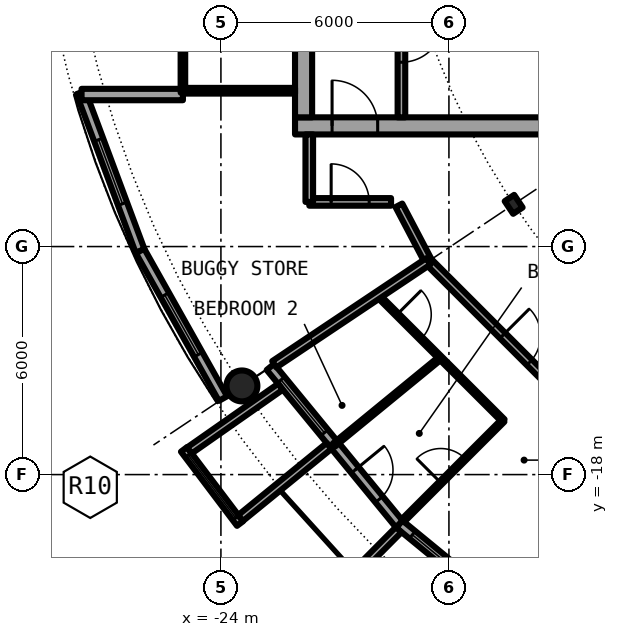
"""IFC4 building model, lengths in metres.
Left out: names, types, materials, properties, quantities, classifications, styles, units other than length and angle.
Written with IfcOpenShell. Run it as: python <this file> out.ifc"""

import sys

from ifc_helpers import new_model, si_unit, direction, frame, frame_2d, origin, origin_2d, place, context, subcontext, project, spatial, rectangle, circle, hollow_circle, i_section, extrude, element, fill, save


model = new_model("IFC4")
c1 = context("Model", 3, precision=1e-05, world=origin(), true_north=direction((0.0, 1.0)))
c2 = subcontext(c1, "Body", "Model", "MODEL_VIEW")
j1 = project(units=[si_unit("LENGTHUNIT", "METRE"), si_unit("PLANEANGLEUNIT", "RADIAN")], contexts=[c1])
p1 = place(None, origin())
s1 = spatial("IfcSite", under=j1, at=p1, CompositionType="ELEMENT")
p2 = place(p1, origin())
s2 = spatial("IfcBuilding", under=s1, at=p2, CompositionType="ELEMENT")
p3 = place(p2, frame((0.0, 0.0, 199.35)))
s3 = spatial("IfcBuildingStorey", under=s2, at=p3, CompositionType="ELEMENT", Elevation=199.35)
p4 = place(p3, frame((-23.448, -15.667, 0.0), z_axis=(0.0, 0.0, 1.0), x_axis=(1.0, 0.0, 0.0)))
e1 = element("IfcColumn", 1, at=p4, inside=s3, PredefinedType="COLUMN", context=c2, shape_type="SweptSolid", body=[
    extrude(hollow_circle(Radius=0.406, WallThickness=0.03, at=origin_2d()), origin(), (0.0, 0.0, 1.0), 3.05),
])
p5 = place(p3, frame((-16.297, -10.889, 0.0), z_axis=(0.0, 0.0, 1.0), x_axis=(-0.831469612303, -0.55557023302, 0.0)))
e2 = element("IfcColumn", 2, at=p5, inside=s3, PredefinedType="COLUMN", context=c2, shape_type="SweptSolid", body=[
    extrude(i_section(OverallWidth=0.3, OverallDepth=0.4, WebThickness=0.013, FlangeThickness=0.024, FilletRadius=0.027, at=origin_2d()), origin(), (0.0, 0.0, 1.0), 3.05),
])
p6 = place(p3, frame((-22.699, -15.167, 0.0), z_axis=(0.0, 0.0, 1.0), x_axis=(0.634382322723, -0.773019449054, 0.0)))
e3 = element("IfcWall", 3, at=p6, inside=s3, PredefinedType="SOLIDWALL", context=c2, shape_type="SweptSolid", body=[
    extrude(rectangle(XDim=5.352, YDim=0.25, at=frame_2d((2.676, 0.0))), origin(), (0.0, 0.0, 1.0), 2.7),
])
p7 = place(p6, frame((0.441, 0.0, 0.3)))
e4 = element("IfcOpeningElement", 4, at=p7, cuts=e3, PredefinedType="OPENING", context=c2, shape_type="SweptSolid", body=[
    extrude(rectangle(XDim=1.8, YDim=2.1, at=frame_2d((0.9, 1.05))), frame((0.0, 0.135, 0.0), z_axis=(0.0, -1.0, 0.0), x_axis=(1.0, 0.0, 0.0)), (0.0, 0.0, 1.0), 0.27),
])
p8 = place(p6, frame((3.51, 0.0, 0.0)))
e5 = element("IfcOpeningElement", 5, at=p8, cuts=e3, PredefinedType="OPENING", context=c2, shape_type="SweptSolid", body=[
    extrude(rectangle(XDim=1.0, YDim=2.2, at=frame_2d((0.5, 1.1))), frame((0.0, 0.135, 0.0), z_axis=(0.0, -1.0, 0.0), x_axis=(1.0, 0.0, 0.0)), (0.0, 0.0, 1.0), 0.27),
])
p9 = place(p3, frame((-24.972, -17.337, -0.03), z_axis=(0.0, 0.0, 1.0), x_axis=(0.602806268067, -0.797887588059, 0.0)))
e6 = element("IfcWall", 6, at=p9, inside=s3, PredefinedType="SOLIDWALL", context=c2, shape_type="SweptSolid", body=[
    extrude(rectangle(XDim=2.447, YDim=0.2, at=frame_2d((1.223, 0.0))), origin(), (0.0, 0.0, 1.0), 2.73),
])
p10 = place(p9, frame((0.183, 0.0, 0.33)))
e7 = element("IfcOpeningElement", 7, at=p10, cuts=e6, PredefinedType="OPENING", context=c2, shape_type="SweptSolid", body=[
    extrude(circle(Radius=1.04, at=frame_2d((1.04, 1.04))), frame((0.0, 0.11, 0.0), z_axis=(0.0, -1.0, 0.0), x_axis=(1.0, 0.0, 0.0)), (0.0, 0.0, 1.0), 0.22),
])
p11 = place(p3, frame((-22.433, -15.688, -0.03), z_axis=(0.0, 0.0, 1.0), x_axis=(-0.819373043115, -0.573260687834, 0.0)))
e8 = element("IfcWall", 8, at=p11, inside=s3, PredefinedType="SOLIDWALL", context=c2, shape_type="SweptSolid", body=[
    extrude(rectangle(XDim=2.925, YDim=0.2, at=frame_2d((1.463, 0.0))), origin(), (0.0, 0.0, 1.0), 2.73),
])
p12 = place(p3, frame((-21.155, -17.246, -0.03), z_axis=(0.0, 0.0, 1.0), x_axis=(-0.775179004516, -0.631741648902, 0.0)))
e9 = element("IfcWall", 9, at=p12, inside=s3, PredefinedType="SOLIDWALL", context=c2, shape_type="SweptSolid", body=[
    extrude(rectangle(XDim=3.006, YDim=0.2, at=frame_2d((1.503, 0.0))), origin(), (0.0, 0.0, 1.0), 2.73),
])
p13 = place(p3, frame((-19.304, -19.304, 0.0), z_axis=(0.0, 0.0, 1.0), x_axis=(0.773019449054, -0.634382322723, 0.0)))
e10 = element("IfcWall", 10, at=p13, inside=s3, PredefinedType="SOLIDWALL", context=c2, shape_type="SweptSolid", body=[
    extrude(rectangle(XDim=5.352, YDim=0.25, at=frame_2d((2.676, 0.0))), origin(), (0.0, 0.0, 1.0), 2.7),
])
p14 = place(p13, frame((0.441, 0.0, 0.3)))
e11 = element("IfcOpeningElement", 11, at=p14, cuts=e10, PredefinedType="OPENING", context=c2, shape_type="SweptSolid", body=[
    extrude(rectangle(XDim=1.8, YDim=2.1, at=frame_2d((0.9, 1.05))), frame((0.0, 0.135, 0.0), z_axis=(0.0, -1.0, 0.0), x_axis=(1.0, 0.0, 0.0)), (0.0, 0.0, 1.0), 0.27),
])
p15 = place(p13, frame((3.51, 0.0, 0.0)))
e12 = element("IfcOpeningElement", 12, at=p15, cuts=e10, PredefinedType="OPENING", context=c2, shape_type="SweptSolid", body=[
    extrude(rectangle(XDim=1.0, YDim=2.2, at=frame_2d((0.5, 1.1))), frame((0.0, 0.135, 0.0), z_axis=(0.0, -1.0, 0.0), x_axis=(1.0, 0.0, 0.0)), (0.0, 0.0, 1.0), 0.27),
])
p16 = place(p3, frame((-19.323, -19.45, -0.03), z_axis=(0.0, 0.0, 1.0), x_axis=(-0.704476739375, -0.709727076896, 0.0)))
e13 = element("IfcWall", 13, at=p16, inside=s3, PredefinedType="SOLIDWALL", context=c2, shape_type="SweptSolid", body=[
    extrude(rectangle(XDim=2.883, YDim=0.2, at=frame_2d((1.441, 0.0))), origin(), (0.0, 0.0, 1.0), 2.73),
])
p17 = place(p3, frame((-27.682, -7.945, 0.0), z_axis=(0.0, 0.0, 1.0), x_axis=(0.349247811493, -0.937030397675, 0.0)))
e14 = element("IfcWall", 14, at=p17, inside=s3, PredefinedType="SOLIDWALL", context=c2, shape_type="SweptSolid", body=[
    extrude(rectangle(XDim=4.452, YDim=0.25, at=frame_2d((2.226, 0.0))), origin(), (0.0, 0.0, 1.0), 2.7),
])
p18 = place(p17, frame((1.327, 0.0, 0.3)))
e15 = element("IfcOpeningElement", 15, at=p18, cuts=e14, PredefinedType="OPENING", context=c2, shape_type="SweptSolid", body=[
    extrude(rectangle(XDim=1.8, YDim=2.1, at=frame_2d((0.9, 1.05))), frame((0.0, 0.135, 0.0), z_axis=(0.0, -1.0, 0.0), x_axis=(1.0, 0.0, 0.0)), (0.0, 0.0, 1.0), 0.27),
])
p19 = place(p3, frame((-26.127, -12.117, 0.0), z_axis=(0.0, 0.0, 1.0), x_axis=(0.489696356642, -0.871893042919, 0.0)))
e16 = element("IfcWall", 16, at=p19, inside=s3, PredefinedType="SOLIDWALL", context=c2, shape_type="SweptSolid", body=[
    extrude(rectangle(XDim=4.454, YDim=0.25, at=frame_2d((2.227, 0.0))), origin(), (0.0, 0.0, 1.0), 2.7),
])
p20 = place(p19, frame((1.327, 0.0, 0.3)))
e17 = element("IfcOpeningElement", 17, at=p20, cuts=e16, PredefinedType="OPENING", context=c2, shape_type="SweptSolid", body=[
    extrude(rectangle(XDim=1.8, YDim=2.1, at=frame_2d((0.9, 1.05))), frame((0.0, 0.135, 0.0), z_axis=(0.0, -1.0, 0.0), x_axis=(1.0, 0.0, 0.0)), (0.0, 0.0, 1.0), 0.27),
])
p21 = place(p3, frame((-25.0, -8.0, 0.0), z_axis=(0.0, 0.0, 1.0), x_axis=(-1.0, 0.0, 0.0)))
e18 = element("IfcWall", 18, at=p21, inside=s3, PredefinedType="SOLIDWALL", context=c2, shape_type="SweptSolid", body=[
    extrude(rectangle(XDim=2.667, YDim=0.3, at=frame_2d((1.333, 0.0))), origin(), (0.0, 0.0, 1.0), 2.7),
])
p22 = place(p3, frame((-22.05, -8.825, 0.0), z_axis=(0.0, 0.0, 1.0), x_axis=(1.0, 0.0, 0.0)))
e19 = element("IfcWall", 19, at=p22, inside=s3, PredefinedType="SHEAR", context=c2, shape_type="SweptSolid", body=[
    extrude(rectangle(XDim=13.5, YDim=0.45, at=frame_2d((6.75, 0.0))), origin(), (0.0, 0.0, 1.0), 3.05),
])
p23 = place(p22, frame((0.975, 0.0, 0.0)))
e20 = element("IfcOpeningElement", 20, at=p23, cuts=e19, PredefinedType="OPENING", context=c2, shape_type="SweptSolid", body=[
    extrude(rectangle(XDim=1.2, YDim=2.3, at=frame_2d((0.6, 1.15))), frame((0.0, 0.235, 0.0), z_axis=(0.0, -1.0, 0.0), x_axis=(1.0, 0.0, 0.0)), (0.0, 0.0, 1.0), 0.47),
])
p24 = place(p3, frame((-21.825, -8.6, 0.0), z_axis=(0.0, 0.0, 1.0), x_axis=(0.0, 1.0, 0.0)))
e21 = element("IfcWall", 21, at=p24, inside=s3, PredefinedType="SHEAR", context=c2, shape_type="SweptSolid", body=[
    extrude(rectangle(XDim=17.2, YDim=0.45, at=frame_2d((8.6, 0.0))), origin(), (0.0, 0.0, 1.0), 3.05),
])
p25 = place(p24, frame((7.7, 0.0, 0.0)))
e22 = element("IfcOpeningElement", 22, at=p25, cuts=e21, PredefinedType="OPENING", context=c2, shape_type="SweptSolid", body=[
    extrude(rectangle(XDim=1.8, YDim=2.3, at=frame_2d((0.9, 1.15))), frame((0.0, 0.235, 0.0), z_axis=(0.0, -1.0, 0.0), x_axis=(1.0, 0.0, 0.0)), (0.0, 0.0, 1.0), 0.47),
])
p26 = place(p3, frame((-19.25, -1.575, 0.0), z_axis=(0.0, 0.0, 1.0), x_axis=(0.0, -1.0, 0.0)))
e23 = element("IfcWall", 23, at=p26, inside=s3, PredefinedType="SOLIDWALL", context=c2, shape_type="SweptSolid", body=[
    extrude(rectangle(XDim=7.025, YDim=0.2, at=frame_2d((3.513, 0.0))), origin(), (0.0, 0.0, 1.0), 2.7),
])
p27 = place(p26, frame((4.475, 0.0, 0.0)))
e24 = element("IfcOpeningElement", 24, at=p27, cuts=e23, PredefinedType="OPENING", context=c2, shape_type="SweptSolid", body=[
    extrude(rectangle(XDim=1.1, YDim=2.3, at=frame_2d((0.55, 1.15))), frame((0.0, 0.11, 0.0), z_axis=(0.0, -1.0, 0.0), x_axis=(1.0, 0.0, 0.0)), (0.0, 0.0, 1.0), 0.22),
])
p28 = place(p3, frame((-22.05, -7.9, 0.0), z_axis=(0.0, 0.0, 1.0), x_axis=(-1.0, 0.0, 0.0)))
e25 = element("IfcWall", 25, at=p28, inside=s3, PredefinedType="PARTITIONING", context=c2, shape_type="SweptSolid", body=[
    extrude(rectangle(XDim=2.89, YDim=0.15, at=frame_2d((1.445, 0.0))), origin(), (0.0, 0.0, 1.0), 2.7),
])
p29 = place(p3, frame((-25.0, 7.95, 0.0), z_axis=(0.0, 0.0, 1.0), x_axis=(0.0, -1.0, 0.0)))
e26 = element("IfcWall", 26, at=p29, inside=s3, PredefinedType="PARTITIONING", context=c2, shape_type="SweptSolid", body=[
    extrude(rectangle(XDim=15.9, YDim=0.12, at=frame_2d((7.95, 0.0))), origin(), (0.0, 0.0, 1.0), 2.7),
])
p30 = place(p29, frame((0.95, 0.0, 0.1)))
e27 = element("IfcOpeningElement", 27, at=p30, cuts=e26, PredefinedType="OPENING", context=c2, shape_type="SweptSolid", body=[
    extrude(rectangle(XDim=14.0, YDim=2.35, at=frame_2d((7.0, 1.175))), frame((0.0, 0.07, 0.0), z_axis=(0.0, -1.0, 0.0), x_axis=(1.0, 0.0, 0.0)), (0.0, 0.0, 1.0), 0.14),
])
p31 = place(p3, frame((-19.869, -13.285, 0.0), z_axis=(0.0, 0.0, 1.0), x_axis=(0.707290020325, -0.706923494552, 0.0)))
e28 = element("IfcWall", 28, at=p31, inside=s3, PredefinedType="PARTITIONING", context=c2, shape_type="SweptSolid", body=[
    extrude(rectangle(XDim=4.663, YDim=0.1, at=frame_2d((2.331, 0.0))), origin(), (0.0, 0.0, 1.0), 2.7),
])
p32 = place(p31, frame((0.712, 0.0, 0.0)))
e29 = element("IfcOpeningElement", 29, at=p32, cuts=e28, PredefinedType="OPENING", context=c2, shape_type="SweptSolid", body=[
    extrude(rectangle(XDim=0.9, YDim=2.3, at=frame_2d((0.45, 1.15))), frame((0.0, 0.06, 0.0), z_axis=(0.0, -1.0, 0.0), x_axis=(1.0, 0.0, 0.0)), (0.0, 0.0, 1.0), 0.12),
])
p33 = place(p3, frame((-19.317, -10.915, 0.0), z_axis=(0.0, 0.0, 1.0), x_axis=(0.465359652486, -0.885121683068, 0.0)))
e30 = element("IfcWall", 30, at=p33, inside=s3, PredefinedType="PARTITIONING", context=c2, shape_type="SweptSolid", body=[
    extrude(rectangle(XDim=1.665, YDim=0.2, at=frame_2d((0.833, 0.0))), origin(), (0.0, 0.0, 1.0), 2.7),
])
p34 = place(p3, frame((-18.542, -12.389, 0.0), z_axis=(0.0, 0.0, 1.0), x_axis=(0.707106781187, -0.707106781187, 0.0)))
e31 = element("IfcWall", 31, at=p34, inside=s3, PredefinedType="PARTITIONING", context=c2, shape_type="SweptSolid", body=[
    extrude(rectangle(XDim=8.702, YDim=0.2, at=frame_2d((4.351, 0.0))), origin(), (0.0, 0.0, 1.0), 2.7),
])
p35 = place(p34, frame((2.763, 0.0, 0.0)))
e32 = element("IfcOpeningElement", 32, at=p35, cuts=e31, PredefinedType="OPENING", context=c2, shape_type="SweptSolid", body=[
    extrude(rectangle(XDim=1.0, YDim=2.3, at=frame_2d((0.5, 1.15))), frame((0.0, 0.11, 0.0), z_axis=(0.0, -1.0, 0.0), x_axis=(1.0, 0.0, 0.0)), (0.0, 0.0, 1.0), 0.22),
])
p36 = place(p3, frame((-21.675, -10.825, 0.0), z_axis=(0.0, 0.0, 1.0), x_axis=(1.0, 0.0, 0.0)))
e33 = element("IfcWall", 33, at=p36, inside=s3, PredefinedType="PARTITIONING", context=c2, shape_type="SweptSolid", body=[
    extrude(rectangle(XDim=2.152, YDim=0.2, at=frame_2d((1.076, 0.0))), origin(), (0.0, 0.0, 1.0), 2.7),
])
p37 = place(p36, frame((0.576, 0.0, 0.0)))
e34 = element("IfcOpeningElement", 34, at=p37, cuts=e33, PredefinedType="OPENING", context=c2, shape_type="SweptSolid", body=[
    extrude(rectangle(XDim=1.0, YDim=2.3, at=frame_2d((0.5, 1.15))), frame((0.0, 0.11, 0.0), z_axis=(0.0, -1.0, 0.0), x_axis=(1.0, 0.0, 0.0)), (0.0, 0.0, 1.0), 0.22),
])
p38 = place(p3, frame((-22.595, -15.098, 0.0), z_axis=(0.0, 0.0, 1.0), x_axis=(0.831387096605, 0.55569370664, 0.0)))
e35 = element("IfcWall", 35, at=p38, inside=s3, PredefinedType="PARTITIONING", context=c2, shape_type="SweptSolid", body=[
    extrude(rectangle(XDim=4.875, YDim=0.2, at=frame_2d((2.438, 0.0))), origin(), (0.0, 0.0, 1.0), 2.7),
])
p39 = place(p3, frame((-21.023, -17.22, 0.0), z_axis=(0.0, 0.0, 1.0), x_axis=(0.773548271597, 0.633737383709, 0.0)))
e36 = element("IfcWall", 36, at=p39, inside=s3, PredefinedType="PARTITIONING", context=c2, shape_type="SweptSolid", body=[
    extrude(rectangle(XDim=3.618, YDim=0.1, at=frame_2d((1.809, 0.0))), origin(), (0.0, 0.0, 1.0), 2.7),
])
p40 = place(p3, frame((-19.216, -19.216, 0.0), z_axis=(0.0, 0.0, 1.0), x_axis=(0.707106781187, 0.707106781187, 0.0)))
e37 = element("IfcWall", 37, at=p40, inside=s3, PredefinedType="PARTITIONING", context=c2, shape_type="SweptSolid", body=[
    extrude(rectangle(XDim=3.735, YDim=0.1, at=frame_2d((1.868, 0.0))), origin(), (0.0, 0.0, 1.0), 2.7),
])
p41 = place(p40, frame((1.417, 0.0, 0.0)))
e38 = element("IfcOpeningElement", 38, at=p41, cuts=e37, PredefinedType="OPENING", context=c2, shape_type="SweptSolid", body=[
    extrude(rectangle(XDim=0.9, YDim=2.3, at=frame_2d((0.45, 1.15))), frame((0.0, 0.06, 0.0), z_axis=(0.0, -1.0, 0.0), x_axis=(1.0, 0.0, 0.0)), (0.0, 0.0, 1.0), 0.12),
])
p42 = place(p3, frame((-21.675, -10.825, 0.0), z_axis=(0.0, 0.0, 1.0), x_axis=(0.0, 1.0, 0.0)))
e39 = element("IfcWall", 39, at=p42, inside=s3, PredefinedType="PARTITIONING", context=c2, shape_type="SweptSolid", body=[
    extrude(rectangle(XDim=1.775, YDim=0.2, at=frame_2d((0.887, 0.0))), origin(), (0.0, 0.0, 1.0), 2.7),
])
p43 = place(p7, origin())
e40 = element("IfcWindow", 40, at=p43, inside=s3, PartitioningType="SINGLE_PANEL", PredefinedType="WINDOW", context=c2, shape_type="SweptSolid", body=[
    extrude(rectangle(XDim=1.8, YDim=2.1, at=frame_2d((0.9, 1.05))), frame((0.0, 0.03, 0.0), z_axis=(0.0, -1.0, 0.0), x_axis=(1.0, 0.0, 0.0)), (0.0, 0.0, 1.0), 0.06),
])
fill(e4, e40)
p44 = place(p10, origin())
e41 = element("IfcWindow", 41, at=p44, inside=s3, PartitioningType="SINGLE_PANEL", PredefinedType="WINDOW", context=c2, shape_type="SweptSolid", body=[
    extrude(circle(Radius=1.04, at=frame_2d((1.04, 1.04))), frame((0.0, 0.03, 0.0), z_axis=(0.0, -1.0, 0.0), x_axis=(1.0, 0.0, 0.0)), (0.0, 0.0, 1.0), 0.06),
])
fill(e7, e41)
p45 = place(p8, origin())
e42 = element("IfcDoor", 42, at=p45, inside=s3, OperationType="SINGLE_SWING_LEFT", PredefinedType="DOOR", context=c2, shape_type="SweptSolid", body=[
    extrude(rectangle(XDim=1.0, YDim=2.2, at=frame_2d((0.5, 1.1))), frame((0.0, 0.025, 0.0), z_axis=(0.0, -1.0, 0.0), x_axis=(1.0, 0.0, 0.0)), (0.0, 0.0, 1.0), 0.05),
])
fill(e5, e42)
p46 = place(p14, origin())
e43 = element("IfcWindow", 43, at=p46, inside=s3, PartitioningType="SINGLE_PANEL", PredefinedType="WINDOW", context=c2, shape_type="SweptSolid", body=[
    extrude(rectangle(XDim=1.8, YDim=2.1, at=frame_2d((0.9, 1.05))), frame((0.0, 0.03, 0.0), z_axis=(0.0, -1.0, 0.0), x_axis=(1.0, 0.0, 0.0)), (0.0, 0.0, 1.0), 0.06),
])
fill(e11, e43)
p47 = place(p18, origin())
e44 = element("IfcWindow", 44, at=p47, inside=s3, PartitioningType="SINGLE_PANEL", PredefinedType="WINDOW", context=c2, shape_type="SweptSolid", body=[
    extrude(rectangle(XDim=1.8, YDim=2.1, at=frame_2d((0.9, 1.05))), frame((0.0, 0.03, 0.0), z_axis=(0.0, -1.0, 0.0), x_axis=(1.0, 0.0, 0.0)), (0.0, 0.0, 1.0), 0.06),
])
fill(e15, e44)
p48 = place(p20, origin())
e45 = element("IfcWindow", 45, at=p48, inside=s3, PartitioningType="SINGLE_PANEL", PredefinedType="WINDOW", context=c2, shape_type="SweptSolid", body=[
    extrude(rectangle(XDim=1.8, YDim=2.1, at=frame_2d((0.9, 1.05))), frame((0.0, 0.03, 0.0), z_axis=(0.0, -1.0, 0.0), x_axis=(1.0, 0.0, 0.0)), (0.0, 0.0, 1.0), 0.06),
])
fill(e17, e45)
p49 = place(p27, origin())
e46 = element("IfcDoor", 46, at=p49, inside=s3, OperationType="SINGLE_SWING_LEFT", PredefinedType="DOOR", context=c2, shape_type="SweptSolid", body=[
    extrude(rectangle(XDim=1.1, YDim=2.3, at=frame_2d((0.55, 1.15))), frame((0.0, 0.025, 0.0), z_axis=(0.0, -1.0, 0.0), x_axis=(1.0, 0.0, 0.0)), (0.0, 0.0, 1.0), 0.05),
])
fill(e24, e46)
p50 = place(p23, origin())
e47 = element("IfcDoor", 47, at=p50, inside=s3, OperationType="SINGLE_SWING_RIGHT", PredefinedType="DOOR", context=c2, shape_type="SweptSolid", body=[
    extrude(rectangle(XDim=1.2, YDim=2.3, at=frame_2d((0.6, 1.15))), frame((0.0, 0.025, 0.0), z_axis=(0.0, -1.0, 0.0), x_axis=(1.0, 0.0, 0.0)), (0.0, 0.0, 1.0), 0.05),
])
fill(e20, e47)
p51 = place(p30, origin())
e48 = element("IfcWindow", 48, at=p51, inside=s3, PartitioningType="SINGLE_PANEL", PredefinedType="WINDOW", context=c2, shape_type="SweptSolid", body=[
    extrude(rectangle(XDim=14.0, YDim=2.35, at=frame_2d((7.0, 1.175))), frame((0.0, 0.03, 0.0), z_axis=(0.0, -1.0, 0.0), x_axis=(1.0, 0.0, 0.0)), (0.0, 0.0, 1.0), 0.06),
])
fill(e27, e48)
p52 = place(p35, origin())
e49 = element("IfcDoor", 49, at=p52, inside=s3, OperationType="SINGLE_SWING_LEFT", PredefinedType="DOOR", context=c2, shape_type="SweptSolid", body=[
    extrude(rectangle(XDim=1.0, YDim=2.3, at=frame_2d((0.5, 1.15))), frame((0.0, 0.025, 0.0), z_axis=(0.0, -1.0, 0.0), x_axis=(1.0, 0.0, 0.0)), (0.0, 0.0, 1.0), 0.05),
])
fill(e32, e49)
p53 = place(p41, origin())
e50 = element("IfcDoor", 50, at=p53, inside=s3, OperationType="SINGLE_SWING_LEFT", PredefinedType="DOOR", context=c2, shape_type="SweptSolid", body=[
    extrude(rectangle(XDim=0.9, YDim=2.3, at=frame_2d((0.45, 1.15))), frame((0.0, 0.025, 0.0), z_axis=(0.0, -1.0, 0.0), x_axis=(1.0, 0.0, 0.0)), (0.0, 0.0, 1.0), 0.05),
])
fill(e38, e50)
p54 = place(p32, origin())
e51 = element("IfcDoor", 51, at=p54, inside=s3, OperationType="SINGLE_SWING_LEFT", PredefinedType="DOOR", context=c2, shape_type="SweptSolid", body=[
    extrude(rectangle(XDim=0.9, YDim=2.3, at=frame_2d((0.45, 1.15))), frame((0.0, 0.025, 0.0), z_axis=(0.0, -1.0, 0.0), x_axis=(1.0, 0.0, 0.0)), (0.0, 0.0, 1.0), 0.05),
])
fill(e29, e51)
p55 = place(p37, origin())
e52 = element("IfcDoor", 52, at=p55, inside=s3, OperationType="SINGLE_SWING_LEFT", PredefinedType="DOOR", context=c2, shape_type="SweptSolid", body=[
    extrude(rectangle(XDim=1.0, YDim=2.3, at=frame_2d((0.5, 1.15))), frame((0.0, 0.025, 0.0), z_axis=(0.0, -1.0, 0.0), x_axis=(1.0, 0.0, 0.0)), (0.0, 0.0, 1.0), 0.05),
])
fill(e34, e52)
save(model, sys.argv[1])
